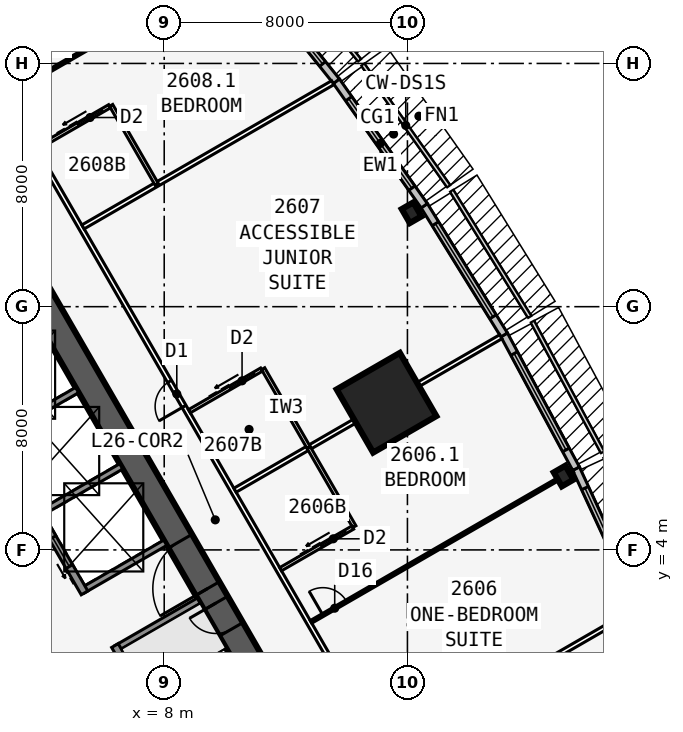
"""IFC4 building model, lengths in metres.
Left out: names, types, materials, properties, quantities, classifications, styles, units other than length and angle.
Written with IfcOpenShell. Run it as: python <this file> out.ifc"""

import sys

from ifc_helpers import new_model, si_unit, direction, frame, frame_2d, origin, origin_2d, place, context, subcontext, project, spatial, rectangle, i_section, extrude, element, fill, save


model = new_model("IFC4")
c1 = context("Model", 3, precision=1e-05, world=origin(), true_north=direction((0.0, 1.0)))
c2 = subcontext(c1, "Body", "Model", "MODEL_VIEW")
j1 = project(units=[si_unit("LENGTHUNIT", "METRE"), si_unit("PLANEANGLEUNIT", "RADIAN")], contexts=[c1])
p1 = place(None, origin())
s1 = spatial("IfcSite", under=j1, at=p1, CompositionType="ELEMENT")
p2 = place(p1, origin())
s2 = spatial("IfcBuilding", under=s1, at=p2, CompositionType="ELEMENT")
p3 = place(p2, frame((0.0, 0.0, 99.9)))
s3 = spatial("IfcBuildingStorey", under=s2, at=p3, CompositionType="ELEMENT", Elevation=99.9)
p4 = place(p3, frame((16.5, -9.526, 0.0), z_axis=(0.0, 0.0, 1.0), x_axis=(-0.499999749417, 0.866025548458, 0.0)))
e1 = element("IfcWall", 1, at=p4, inside=s3, PredefinedType="SHEAR", context=c2, shape_type="SweptSolid", body=[
    extrude(rectangle(XDim=33.0, YDim=0.9, at=frame_2d((16.5, 0.0))), origin(), (0.0, 0.0, 1.0), 3.4),
])
p5 = place(p4, frame((14.15, 0.0, 0.0)))
e2 = element("IfcOpeningElement", 2, at=p5, cuts=e1, PredefinedType="OPENING", context=c2, shape_type="SweptSolid", body=[
    extrude(rectangle(XDim=1.8, YDim=2.13, at=frame_2d((0.9, 1.065))), frame((0.0, 0.46, 0.0), z_axis=(0.0, -1.0, 0.0), x_axis=(1.0, 0.0, 0.0)), (0.0, 0.0, 1.0), 0.92),
])
p6 = place(p4, frame((12.6, 0.0, 0.0)))
e3 = element("IfcOpeningElement", 3, at=p6, cuts=e1, PredefinedType="OPENING", context=c2, shape_type="SweptSolid", body=[
    extrude(rectangle(XDim=1.0, YDim=2.13, at=frame_2d((0.5, 1.065))), frame((0.0, 0.46, 0.0), z_axis=(0.0, -1.0, 0.0), x_axis=(1.0, 0.0, 0.0)), (0.0, 0.0, 1.0), 0.92),
])
p7 = place(p3, frame((10.245, -5.843, 0.0), z_axis=(0.0, 0.0, 1.0), x_axis=(-0.499993009313, 0.866029439822, 0.0)))
e4 = element("IfcWall", 4, at=p7, inside=s3, PredefinedType="SOLIDWALL", context=c2, shape_type="SweptSolid", body=[
    extrude(rectangle(XDim=7.733, YDim=0.25, at=frame_2d((3.866, 0.0))), origin(), (0.0, 0.0, 1.0), 3.15),
])
p8 = place(p3, frame((5.379, 2.586, 0.0), z_axis=(0.0, 0.0, 1.0), x_axis=(-0.500001375892, 0.866024609411, 0.0)))
e5 = element("IfcWall", 5, at=p8, inside=s3, PredefinedType="SOLIDWALL", context=c2, shape_type="SweptSolid", body=[
    extrude(rectangle(XDim=10.633, YDim=0.25, at=frame_2d((5.316, 0.0))), origin(), (0.0, 0.0, 1.0), 3.15),
])
p9 = place(p8, frame((9.164, 0.0, 0.0)))
e6 = element("IfcOpeningElement", 6, at=p9, cuts=e5, PredefinedType="OPENING", context=c2, shape_type="SweptSolid", body=[
    extrude(rectangle(XDim=0.9, YDim=2.13, at=frame_2d((0.45, 1.065))), frame((0.0, 0.135, 0.0), z_axis=(0.0, -1.0, 0.0), x_axis=(1.0, 0.0, 0.0)), (0.0, 0.0, 1.0), 0.27),
])
p10 = place(p8, frame((1.0, 0.0, 0.0)))
e7 = element("IfcOpeningElement", 7, at=p10, cuts=e5, PredefinedType="OPENING", context=c2, shape_type="SweptSolid", body=[
    extrude(rectangle(XDim=1.1, YDim=2.13, at=frame_2d((0.55, 1.065))), frame((0.0, 0.135, 0.0), z_axis=(0.0, -1.0, 0.0), x_axis=(1.0, 0.0, 0.0)), (0.0, 0.0, 1.0), 0.27),
])
p11 = place(p8, frame((3.9, 0.0, 0.0)))
e8 = element("IfcOpeningElement", 8, at=p11, cuts=e5, PredefinedType="OPENING", context=c2, shape_type="SweptSolid", body=[
    extrude(rectangle(XDim=1.1, YDim=2.13, at=frame_2d((0.55, 1.065))), frame((0.0, 0.135, 0.0), z_axis=(0.0, -1.0, 0.0), x_axis=(1.0, 0.0, 0.0)), (0.0, 0.0, 1.0), 0.27),
])
p12 = place(p8, frame((6.8, 0.0, 0.0)))
e9 = element("IfcOpeningElement", 9, at=p12, cuts=e5, PredefinedType="OPENING", context=c2, shape_type="SweptSolid", body=[
    extrude(rectangle(XDim=1.1, YDim=2.13, at=frame_2d((0.55, 1.065))), frame((0.0, 0.135, 0.0), z_axis=(0.0, -1.0, 0.0), x_axis=(1.0, 0.0, 0.0)), (0.0, 0.0, 1.0), 0.27),
])
for number, where, z_axis, x_axis in (
    (10, (6.429, 0.767, 0.0), (0.0, 0.0, 1.0), (0.866, 0.5, 0.0)),
    (11, (5.329, 2.673, 0.0), (0.0, 0.0, 1.0), (0.866, 0.5, 0.0)),
    (12, (3.879, 5.184, 0.0), (0.0, 0.0, 1.0), (0.866, 0.5, 0.0)),
    (13, (2.429, 7.696, 0.0), (0.0, 0.0, 1.0), (0.866, 0.5, 0.0)),
):
    element("IfcWall", number, at=place(p3, frame(where, z_axis=z_axis, x_axis=x_axis)), inside=s3, PredefinedType="SOLIDWALL", context=c2, shape_type="SweptSolid", body=[
        extrude(rectangle(XDim=3.125, YDim=0.2, at=frame_2d((1.562, 0.0))), origin(), (0.0, 0.0, 1.0), 3.15),
    ])
for number, where, z_axis, x_axis in (
    (14, (21.137, 6.43, 0.0), (0.0, 0.0, 1.0), (0.866, 0.5, 0.0)),
    (15, (16.137, 15.09, 0.0), (0.0, 0.0, 1.0), (0.866, 0.5, 0.0)),
):
    element("IfcColumn", number, at=place(p3, frame(where, z_axis=z_axis, x_axis=x_axis)), inside=s3, PredefinedType="COLUMN", context=c2, shape_type="SweptSolid", body=[
        extrude(i_section(OverallWidth=0.442, OverallDepth=0.531, WebThickness=0.066, FlangeThickness=0.106, at=origin_2d()), origin(), (0.0, 0.0, 1.0), 3.4),
    ])
p13 = place(p3, frame((15.312, 8.84, 0.0), z_axis=(0.0, 0.0, 1.0), x_axis=(0.866025403784, 0.5, 0.0)))
e16 = element("IfcColumn", 16, at=p13, inside=s3, PredefinedType="COLUMN", context=c2, shape_type="SweptSolid", body=[
    extrude(rectangle(XDim=2.4, YDim=2.4, at=origin_2d()), origin(), (0.0, 0.0, 1.0), 3.4),
])
p14 = place(p3, frame((23.648, 2.119, 0.0), z_axis=(0.0, 0.0, 1.0), x_axis=(-0.419203100754, 0.907892482796, 0.0)))
e17 = element("IfcWall", 17, at=p14, inside=s3, PredefinedType="STANDARD", context=c2, shape_type="SweptSolid", body=[
    extrude(rectangle(XDim=5.021, YDim=0.25, at=frame_2d((2.51, 0.0))), origin(), (0.0, 0.0, 1.0), 3.15),
])
p15 = place(p14, frame((0.71, 0.0, 0.45)))
e18 = element("IfcOpeningElement", 18, at=p15, cuts=e17, PredefinedType="OPENING", context=c2, shape_type="SweptSolid", body=[
    extrude(rectangle(XDim=3.6, YDim=2.4, at=frame_2d((1.8, 1.2))), frame((0.0, 0.135, 0.0), z_axis=(0.0, -1.0, 0.0), x_axis=(1.0, 0.0, 0.0)), (0.0, 0.0, 1.0), 0.27),
])
p16 = place(p3, frame((21.547, 6.671, 0.0), z_axis=(0.0, 0.0, 1.0), x_axis=(-0.473412820489, 0.880840678782, 0.0)))
e19 = element("IfcWall", 19, at=p16, inside=s3, PredefinedType="STANDARD", context=c2, shape_type="SweptSolid", body=[
    extrude(rectangle(XDim=5.002, YDim=0.25, at=frame_2d((2.501, 0.0))), origin(), (0.0, 0.0, 1.0), 3.15),
])
p17 = place(p16, frame((0.701, 0.0, 0.45)))
e20 = element("IfcOpeningElement", 20, at=p17, cuts=e19, PredefinedType="OPENING", context=c2, shape_type="SweptSolid", body=[
    extrude(rectangle(XDim=3.6, YDim=2.4, at=frame_2d((1.8, 1.2))), frame((0.0, 0.135, 0.0), z_axis=(0.0, -1.0, 0.0), x_axis=(1.0, 0.0, 0.0)), (0.0, 0.0, 1.0), 0.27),
])
p18 = place(p3, frame((19.182, 11.071, 0.0), z_axis=(0.0, 0.0, 1.0), x_axis=(-0.526132807704, 0.850402415717, 0.0)))
e21 = element("IfcWall", 21, at=p18, inside=s3, PredefinedType="STANDARD", context=c2, shape_type="SweptSolid", body=[
    extrude(rectangle(XDim=5.002, YDim=0.25, at=frame_2d((2.501, 0.0))), origin(), (0.0, 0.0, 1.0), 3.15),
])
p19 = place(p18, frame((0.701, 0.0, 0.45)))
e22 = element("IfcOpeningElement", 22, at=p19, cuts=e21, PredefinedType="OPENING", context=c2, shape_type="SweptSolid", body=[
    extrude(rectangle(XDim=3.6, YDim=2.4, at=frame_2d((1.8, 1.2))), frame((0.0, 0.135, 0.0), z_axis=(0.0, -1.0, 0.0), x_axis=(1.0, 0.0, 0.0)), (0.0, 0.0, 1.0), 0.27),
])
p20 = place(p3, frame((16.555, 15.318, 0.0), z_axis=(0.0, 0.0, 1.0), x_axis=(-0.5766431066, 0.81699616132, 0.0)))
e23 = element("IfcWall", 23, at=p20, inside=s3, PredefinedType="STANDARD", context=c2, shape_type="SweptSolid", body=[
    extrude(rectangle(XDim=5.021, YDim=0.25, at=frame_2d((2.51, 0.0))), origin(), (0.0, 0.0, 1.0), 3.15),
])
p21 = place(p20, frame((0.71, 0.0, 0.45)))
e24 = element("IfcOpeningElement", 24, at=p21, cuts=e23, PredefinedType="OPENING", context=c2, shape_type="SweptSolid", body=[
    extrude(rectangle(XDim=3.6, YDim=2.4, at=frame_2d((1.8, 1.2))), frame((0.0, 0.135, 0.0), z_axis=(0.0, -1.0, 0.0), x_axis=(1.0, 0.0, 0.0)), (0.0, 0.0, 1.0), 0.27),
])
p22 = place(p3, frame((13.664, 19.414, 0.0), z_axis=(0.0, 0.0, 1.0), x_axis=(-0.624594965756, 0.780948864364, 0.0)))
e25 = element("IfcWall", 25, at=p22, inside=s3, PredefinedType="STANDARD", context=c2, shape_type="SweptSolid", body=[
    extrude(rectangle(XDim=5.058, YDim=0.25, at=frame_2d((2.529, 0.0))), origin(), (0.0, 0.0, 1.0), 3.15),
])
p23 = place(p22, frame((0.729, 0.0, 0.45)))
e26 = element("IfcOpeningElement", 26, at=p23, cuts=e25, PredefinedType="OPENING", context=c2, shape_type="SweptSolid", body=[
    extrude(rectangle(XDim=3.6, YDim=2.4, at=frame_2d((1.8, 1.2))), frame((0.0, 0.135, 0.0), z_axis=(0.0, -1.0, 0.0), x_axis=(1.0, 0.0, 0.0)), (0.0, 0.0, 1.0), 0.27),
])
p24 = place(p3, frame((20.027, -10.985, 0.0), z_axis=(0.0, 0.0, 1.0), x_axis=(-0.500001677587, 0.866024435227, 0.0)))
e27 = element("IfcWall", 27, at=p24, inside=s3, PredefinedType="PARTITIONING", context=c2, shape_type="SweptSolid", body=[
    extrude(rectangle(XDim=39.054, YDim=0.15, at=frame_2d((19.527, 0.0))), origin(), (0.0, 0.0, 1.0), 3.15),
])
p25 = place(p24, frame((1.558, 0.0, 0.0)))
e28 = element("IfcOpeningElement", 28, at=p25, cuts=e27, PredefinedType="OPENING", context=c2, shape_type="SweptSolid", body=[
    extrude(rectangle(XDim=0.95, YDim=2.13, at=frame_2d((0.475, 1.065))), frame((0.0, 0.085, 0.0), z_axis=(0.0, -1.0, 0.0), x_axis=(1.0, 0.0, 0.0)), (0.0, 0.0, 1.0), 0.17),
])
p26 = place(p24, frame((11.552, 0.0, 0.0)))
e29 = element("IfcOpeningElement", 29, at=p26, cuts=e27, PredefinedType="OPENING", context=c2, shape_type="SweptSolid", body=[
    extrude(rectangle(XDim=0.95, YDim=2.13, at=frame_2d((0.475, 1.065))), frame((0.0, 0.085, 0.0), z_axis=(0.0, -1.0, 0.0), x_axis=(1.0, 0.0, 0.0)), (0.0, 0.0, 1.0), 0.17),
])
p27 = place(p24, frame((22.752, 0.0, 0.0)))
e30 = element("IfcOpeningElement", 30, at=p27, cuts=e27, PredefinedType="OPENING", context=c2, shape_type="SweptSolid", body=[
    extrude(rectangle(XDim=0.95, YDim=2.13, at=frame_2d((0.475, 1.065))), frame((0.0, 0.085, 0.0), z_axis=(0.0, -1.0, 0.0), x_axis=(1.0, 0.0, 0.0)), (0.0, 0.0, 1.0), 0.17),
])
p28 = place(p24, frame((36.546, 0.0, 0.0)))
e31 = element("IfcOpeningElement", 31, at=p28, cuts=e27, PredefinedType="OPENING", context=c2, shape_type="SweptSolid", body=[
    extrude(rectangle(XDim=0.95, YDim=2.13, at=frame_2d((0.475, 1.065))), frame((0.0, 0.085, 0.0), z_axis=(0.0, -1.0, 0.0), x_axis=(1.0, 0.0, 0.0)), (0.0, 0.0, 1.0), 0.17),
])
p29 = place(p3, frame((15.329, -2.697, 0.0), z_axis=(0.0, 0.0, 1.0), x_axis=(0.866018409083, 0.500012114982, 0.0)))
e32 = element("IfcWall", 32, at=p29, inside=s3, PredefinedType="PARTITIONING", context=c2, shape_type="SweptSolid", body=[
    extrude(rectangle(XDim=9.485, YDim=0.15, at=frame_2d((4.742, 0.0))), origin(), (0.0, 0.0, 1.0), 2.109),
])
p30 = place(p3, frame((12.829, 1.633, 0.0), z_axis=(0.0, 0.0, 1.0), x_axis=(0.866026934769, 0.499997348248, 0.0)))
e33 = element("IfcWall", 33, at=p30, inside=s3, PredefinedType="PARTITIONING", context=c2, shape_type="SweptSolid", body=[
    extrude(rectangle(XDim=9.943, YDim=0.1, at=frame_2d((4.971, 0.0))), origin(), (0.0, 0.0, 1.0), 2.05),
])
p31 = place(p30, frame((0.45, 0.0, 0.0)))
e34 = element("IfcOpeningElement", 34, at=p31, cuts=e33, PredefinedType="OPENING", context=c2, shape_type="SweptSolid", body=[
    extrude(rectangle(XDim=0.9, YDim=2.032, at=frame_2d((0.45, 1.016))), frame((0.0, 0.06, 0.0), z_axis=(0.0, -1.0, 0.0), x_axis=(1.0, 0.0, 0.0)), (0.0, 0.0, 1.0), 0.12),
])
p32 = place(p3, frame((10.329, 5.963, 0.0), z_axis=(0.0, 0.0, 1.0), x_axis=(0.866021688545, 0.500006434927, 0.0)))
e35 = element("IfcWall", 35, at=p32, inside=s3, PredefinedType="PARTITIONING", context=c2, shape_type="SweptSolid", body=[
    extrude(rectangle(XDim=10.096, YDim=0.15, at=frame_2d((5.048, 0.0))), origin(), (0.0, 0.0, 1.0), 2.109),
])
p33 = place(p3, frame((5.329, 14.623, 0.0), z_axis=(0.0, 0.0, 1.0), x_axis=(0.866018409083, 0.500012114982, 0.0)))
e36 = element("IfcWall", 36, at=p33, inside=s3, PredefinedType="PARTITIONING", context=c2, shape_type="SweptSolid", body=[
    extrude(rectangle(XDim=9.485, YDim=0.15, at=frame_2d((4.742, 0.0))), origin(), (0.0, 0.0, 1.0), 2.109),
])
p34 = place(p3, frame((2.829, 18.954, 0.0), z_axis=(0.0, 0.0, 1.0), x_axis=(0.866020536561, 0.500008430184, 0.0)))
e37 = element("IfcWall", 37, at=p34, inside=s3, PredefinedType="PARTITIONING", context=c2, shape_type="SweptSolid", body=[
    extrude(rectangle(XDim=8.72, YDim=0.1, at=frame_2d((4.36, 0.0))), origin(), (0.0, 0.0, 1.0), 2.05),
])
p35 = place(p34, frame((0.45, 0.0, 0.0)))
e38 = element("IfcOpeningElement", 38, at=p35, cuts=e37, PredefinedType="OPENING", context=c2, shape_type="SweptSolid", body=[
    extrude(rectangle(XDim=0.9, YDim=2.032, at=frame_2d((0.45, 1.016))), frame((0.0, 0.06, 0.0), z_axis=(0.0, -1.0, 0.0), x_axis=(1.0, 0.0, 0.0)), (0.0, 0.0, 1.0), 0.12),
])
p36 = place(p3, frame((14.253, 4.765, 0.0), z_axis=(0.0, 0.0, 1.0), x_axis=(-0.50002537861, 0.866010750942, 0.0)))
e39 = element("IfcWall", 39, at=p36, inside=s3, PredefinedType="PLUMBINGWALL", context=c2, shape_type="SweptSolid", body=[
    extrude(rectangle(XDim=3.0, YDim=0.12, at=frame_2d((1.5, 0.0))), origin(), (0.0, 0.0, 1.0), 3.15),
])
p37 = place(p3, frame((11.829, 3.365, 0.0), z_axis=(0.0, 0.0, 1.0), x_axis=(0.865997131366, 0.500048966069, 0.0)))
e40 = element("IfcWall", 40, at=p37, inside=s3, PredefinedType="PLUMBINGWALL", context=c2, shape_type="SweptSolid", body=[
    extrude(rectangle(XDim=2.74, YDim=0.12, at=frame_2d((1.37, 0.0))), origin(), (0.0, 0.0, 1.0), 3.15),
])
p38 = place(p37, frame((1.55, 0.0, 0.0)))
e41 = element("IfcOpeningElement", 41, at=p38, cuts=e40, PredefinedType="OPENING", context=c2, shape_type="SweptSolid", body=[
    extrude(rectangle(XDim=0.9, YDim=2.13, at=frame_2d((0.45, 1.065))), frame((0.0, 0.07, 0.0), z_axis=(0.0, -1.0, 0.0), x_axis=(1.0, 0.0, 0.0)), (0.0, 0.0, 1.0), 0.14),
])
p39 = place(p3, frame((12.753, 7.363, 0.0), z_axis=(0.0, 0.0, 1.0), x_axis=(-0.499990139034, 0.866031096941, 0.0)))
e42 = element("IfcWall", 42, at=p39, inside=s3, PredefinedType="PLUMBINGWALL", context=c2, shape_type="SweptSolid", body=[
    extrude(rectangle(XDim=3.0, YDim=0.12, at=frame_2d((1.5, 0.0))), origin(), (0.0, 0.0, 1.0), 3.15),
])
p40 = place(p3, frame((8.829, 8.561, 0.0), z_axis=(0.0, 0.0, 1.0), x_axis=(0.866035715982, 0.499982138324, 0.0)))
e43 = element("IfcWall", 43, at=p40, inside=s3, PredefinedType="PLUMBINGWALL", context=c2, shape_type="SweptSolid", body=[
    extrude(rectangle(XDim=2.74, YDim=0.12, at=frame_2d((1.37, 0.0))), origin(), (0.0, 0.0, 1.0), 3.15),
])
p41 = place(p40, frame((1.55, 0.0, 0.0)))
e44 = element("IfcOpeningElement", 44, at=p41, cuts=e43, PredefinedType="OPENING", context=c2, shape_type="SweptSolid", body=[
    extrude(rectangle(XDim=0.9, YDim=2.13, at=frame_2d((0.45, 1.065))), frame((0.0, 0.07, 0.0), z_axis=(0.0, -1.0, 0.0), x_axis=(1.0, 0.0, 0.0)), (0.0, 0.0, 1.0), 0.14),
])
p42 = place(p3, frame((7.753, 16.023, 0.0), z_axis=(0.0, 0.0, 1.0), x_axis=(-0.499990139034, 0.866031096941, 0.0)))
e45 = element("IfcWall", 45, at=p42, inside=s3, PredefinedType="PLUMBINGWALL", context=c2, shape_type="SweptSolid", body=[
    extrude(rectangle(XDim=3.0, YDim=0.12, at=frame_2d((1.5, 0.0))), origin(), (0.0, 0.0, 1.0), 3.15),
])
p43 = place(p3, frame((3.829, 17.221, 0.0), z_axis=(0.0, 0.0, 1.0), x_axis=(0.865997131366, 0.500048966069, 0.0)))
e46 = element("IfcWall", 46, at=p43, inside=s3, PredefinedType="PLUMBINGWALL", context=c2, shape_type="SweptSolid", body=[
    extrude(rectangle(XDim=2.74, YDim=0.12, at=frame_2d((1.37, 0.0))), origin(), (0.0, 0.0, 1.0), 3.15),
])
p44 = place(p43, frame((1.55, 0.0, 0.0)))
e47 = element("IfcOpeningElement", 47, at=p44, cuts=e46, PredefinedType="OPENING", context=c2, shape_type="SweptSolid", body=[
    extrude(rectangle(XDim=0.9, YDim=2.13, at=frame_2d((0.45, 1.065))), frame((0.0, 0.07, 0.0), z_axis=(0.0, -1.0, 0.0), x_axis=(1.0, 0.0, 0.0)), (0.0, 0.0, 1.0), 0.14),
])
p45 = place(p15, origin())
e48 = element("IfcWindow", 48, at=p45, inside=s3, PartitioningType="SINGLE_PANEL", PredefinedType="WINDOW", context=c2, shape_type="SweptSolid", body=[
    extrude(rectangle(XDim=3.6, YDim=2.4, at=frame_2d((1.8, 1.2))), frame((0.0, 0.03, 0.0), z_axis=(0.0, -1.0, 0.0), x_axis=(1.0, 0.0, 0.0)), (0.0, 0.0, 1.0), 0.06),
])
fill(e18, e48)
p46 = place(p17, origin())
e49 = element("IfcWindow", 49, at=p46, inside=s3, PartitioningType="SINGLE_PANEL", PredefinedType="WINDOW", context=c2, shape_type="SweptSolid", body=[
    extrude(rectangle(XDim=3.6, YDim=2.4, at=frame_2d((1.8, 1.2))), frame((0.0, 0.03, 0.0), z_axis=(0.0, -1.0, 0.0), x_axis=(1.0, 0.0, 0.0)), (0.0, 0.0, 1.0), 0.06),
])
fill(e20, e49)
p47 = place(p19, origin())
e50 = element("IfcWindow", 50, at=p47, inside=s3, PartitioningType="SINGLE_PANEL", PredefinedType="WINDOW", context=c2, shape_type="SweptSolid", body=[
    extrude(rectangle(XDim=3.6, YDim=2.4, at=frame_2d((1.8, 1.2))), frame((0.0, 0.03, 0.0), z_axis=(0.0, -1.0, 0.0), x_axis=(1.0, 0.0, 0.0)), (0.0, 0.0, 1.0), 0.06),
])
fill(e22, e50)
p48 = place(p21, origin())
e51 = element("IfcWindow", 51, at=p48, inside=s3, PartitioningType="SINGLE_PANEL", PredefinedType="WINDOW", context=c2, shape_type="SweptSolid", body=[
    extrude(rectangle(XDim=3.6, YDim=2.4, at=frame_2d((1.8, 1.2))), frame((0.0, 0.03, 0.0), z_axis=(0.0, -1.0, 0.0), x_axis=(1.0, 0.0, 0.0)), (0.0, 0.0, 1.0), 0.06),
])
fill(e24, e51)
p49 = place(p23, origin())
e52 = element("IfcWindow", 52, at=p49, inside=s3, PartitioningType="SINGLE_PANEL", PredefinedType="WINDOW", context=c2, shape_type="SweptSolid", body=[
    extrude(rectangle(XDim=3.6, YDim=2.4, at=frame_2d((1.8, 1.2))), frame((0.0, 0.03, 0.0), z_axis=(0.0, -1.0, 0.0), x_axis=(1.0, 0.0, 0.0)), (0.0, 0.0, 1.0), 0.06),
])
fill(e26, e52)
p50 = place(p31, origin())
e53 = element("IfcDoor", 53, at=p50, inside=s3, OperationType="SINGLE_SWING_LEFT", PredefinedType="DOOR", context=c2, shape_type="SweptSolid", body=[
    extrude(rectangle(XDim=0.9, YDim=2.032, at=frame_2d((0.45, 1.016))), frame((0.0, 0.025, 0.0), z_axis=(0.0, -1.0, 0.0), x_axis=(1.0, 0.0, 0.0)), (0.0, 0.0, 1.0), 0.05),
])
fill(e34, e53)
p51 = place(p38, origin())
e54 = element("IfcDoor", 54, at=p51, inside=s3, OperationType="SLIDING_TO_LEFT", PredefinedType="DOOR", context=c2, shape_type="SweptSolid", body=[
    extrude(rectangle(XDim=0.9, YDim=2.13, at=frame_2d((0.45, 1.065))), frame((0.0, 0.025, 0.0), z_axis=(0.0, -1.0, 0.0), x_axis=(1.0, 0.0, 0.0)), (0.0, 0.0, 1.0), 0.05),
])
fill(e41, e54)
p52 = place(p41, origin())
e55 = element("IfcDoor", 55, at=p52, inside=s3, OperationType="SLIDING_TO_LEFT", PredefinedType="DOOR", context=c2, shape_type="SweptSolid", body=[
    extrude(rectangle(XDim=0.9, YDim=2.13, at=frame_2d((0.45, 1.065))), frame((0.0, 0.025, 0.0), z_axis=(0.0, -1.0, 0.0), x_axis=(1.0, 0.0, 0.0)), (0.0, 0.0, 1.0), 0.05),
])
fill(e44, e55)
p53 = place(p27, origin())
e56 = element("IfcDoor", 56, at=p53, inside=s3, OperationType="SINGLE_SWING_LEFT", PredefinedType="DOOR", context=c2, shape_type="SweptSolid", body=[
    extrude(rectangle(XDim=0.95, YDim=2.13, at=frame_2d((0.475, 1.065))), frame((0.0, 0.025, 0.0), z_axis=(0.0, -1.0, 0.0), x_axis=(1.0, 0.0, 0.0)), (0.0, 0.0, 1.0), 0.05),
])
fill(e30, e56)
p54 = place(p44, origin())
e57 = element("IfcDoor", 57, at=p54, inside=s3, OperationType="SLIDING_TO_LEFT", PredefinedType="DOOR", context=c2, shape_type="SweptSolid", body=[
    extrude(rectangle(XDim=0.9, YDim=2.13, at=frame_2d((0.45, 1.065))), frame((0.0, 0.025, 0.0), z_axis=(0.0, -1.0, 0.0), x_axis=(1.0, 0.0, 0.0)), (0.0, 0.0, 1.0), 0.05),
])
fill(e47, e57)
p55 = place(p5, origin())
e58 = element("IfcDoor", 58, at=p55, inside=s3, OperationType="DOUBLE_DOOR_SINGLE_SWING", PredefinedType="DOOR", context=c2, shape_type="SweptSolid", body=[
    extrude(rectangle(XDim=1.8, YDim=2.13, at=frame_2d((0.9, 1.065))), frame((0.0, 0.025, 0.0), z_axis=(0.0, -1.0, 0.0), x_axis=(1.0, 0.0, 0.0)), (0.0, 0.0, 1.0), 0.05),
])
fill(e2, e58)
p56 = place(p6, origin())
e59 = element("IfcDoor", 59, at=p56, inside=s3, OperationType="SINGLE_SWING_RIGHT", PredefinedType="DOOR", context=c2, shape_type="SweptSolid", body=[
    extrude(rectangle(XDim=1.0, YDim=2.13, at=frame_2d((0.5, 1.065))), frame((0.0, 0.025, 0.0), z_axis=(0.0, -1.0, 0.0), x_axis=(1.0, 0.0, 0.0)), (0.0, 0.0, 1.0), 0.05),
])
fill(e3, e59)
p57 = place(p10, origin())
e60 = element("IfcDoor", 60, at=p57, inside=s3, OperationType="DOUBLE_DOOR_SLIDING", PredefinedType="USERDEFINED", context=c2, shape_type="SweptSolid", body=[
    extrude(rectangle(XDim=1.1, YDim=2.13, at=frame_2d((0.55, 1.065))), frame((0.0, 0.025, 0.0), z_axis=(0.0, -1.0, 0.0), x_axis=(1.0, 0.0, 0.0)), (0.0, 0.0, 1.0), 0.05),
])
fill(e7, e60)
save(model, sys.argv[1])
